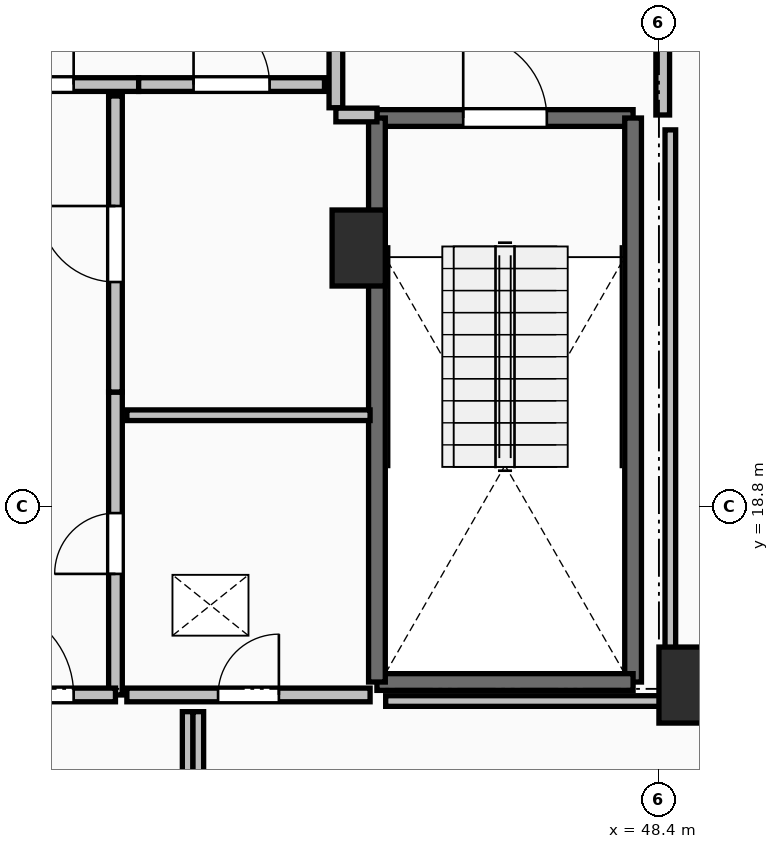
"""IFC4 building model, lengths in metres.
Left out: names, types, materials, properties, quantities, classifications, styles, units other than length and angle.
Written with IfcOpenShell. Run it as: python <this file> out.ifc"""

import sys

from ifc_helpers import new_model, si_unit, direction, frame, frame_2d, origin, origin_2d, place, context, subcontext, project, spatial, rectangle, extrude, element, fill, save


model = new_model("IFC4")
c1 = context("Model", 3, precision=1e-05, world=origin(), true_north=direction((0.0, 1.0)))
c2 = subcontext(c1, "Body", "Model", "MODEL_VIEW")
j1 = project(units=[si_unit("LENGTHUNIT", "METRE"), si_unit("PLANEANGLEUNIT", "RADIAN")], contexts=[c1])
p1 = place(None, origin())
s1 = spatial("IfcSite", under=j1, at=p1, CompositionType="ELEMENT")
p2 = place(p1, origin())
s2 = spatial("IfcBuilding", under=s1, at=p2, CompositionType="ELEMENT")
p3 = place(p2, frame((0.0, 0.0, 273.3)))
s3 = spatial("IfcBuildingStorey", under=s2, at=p3, CompositionType="ELEMENT", Elevation=273.3)
for number, where, z_axis, x_axis in (
    (1, (48.75, 16.45, 0.0), (0.0, 0.0, 1.0), (1.0, 0.0, 0.0)),
    (2, (44.45, 22.2, 0.0), (0.0, 0.0, 1.0), (1.0, 0.0, 0.0)),
):
    element("IfcColumn", number, at=place(p3, frame(where, z_axis=z_axis, x_axis=x_axis)), inside=s3, PredefinedType="PILASTER", context=c2, shape_type="SweptSolid", body=[
        extrude(rectangle(XDim=0.7, YDim=1.0, at=origin_2d()), origin(), (0.0, 0.0, 1.0), 3.55),
    ])
p4 = place(p3, frame((44.69, 23.91, 0.0), z_axis=(0.0, 0.0, 1.0), x_axis=(1.0, 0.0, 0.0)))
e3 = element("IfcWall", 3, at=p4, inside=s3, PredefinedType="SOLIDWALL", context=c2, shape_type="SweptSolid", body=[
    extrude(rectangle(XDim=3.37, YDim=0.22, at=frame_2d((1.685, 0.0))), origin(), (0.0, 0.0, 1.0), 3.29),
])
p5 = place(p4, frame((1.135, 0.0, 0.0)))
e4 = element("IfcOpeningElement", 4, at=p5, cuts=e3, PredefinedType="OPENING", context=c2, shape_type="SweptSolid", body=[
    extrude(rectangle(XDim=1.1, YDim=2.15, at=frame_2d((0.55, 1.075))), frame((0.0, 0.125, 0.0), z_axis=(0.0, -1.0, 0.0), x_axis=(1.0, 0.0, 0.0)), (0.0, 0.0, 1.0), 0.25),
])
p6 = place(p3, frame((48.06, 23.91, 0.0), z_axis=(0.0, 0.0, 1.0), x_axis=(0.0, -1.0, 0.0)))
e5 = element("IfcWall", 5, at=p6, inside=s3, PredefinedType="SOLIDWALL", context=c2, shape_type="SweptSolid", body=[
    extrude(rectangle(XDim=7.42, YDim=0.22, at=frame_2d((3.71, 0.0))), origin(), (0.0, 0.0, 1.0), 3.29),
])
p7 = place(p3, frame((48.06, 16.49, 0.0), z_axis=(0.0, 0.0, 1.0), x_axis=(-1.0, 0.0, 0.0)))
e6 = element("IfcWall", 6, at=p7, inside=s3, PredefinedType="SOLIDWALL", context=c2, shape_type="SweptSolid", body=[
    extrude(rectangle(XDim=3.37, YDim=0.22, at=frame_2d((1.685, 0.0))), origin(), (0.0, 0.0, 1.0), 3.29),
])
p8 = place(p3, frame((44.69, 16.49, 0.0), z_axis=(0.0, 0.0, 1.0), x_axis=(0.0, 1.0, 0.0)))
e7 = element("IfcWall", 7, at=p8, inside=s3, PredefinedType="SOLIDWALL", context=c2, shape_type="SweptSolid", body=[
    extrude(rectangle(XDim=7.42, YDim=0.22, at=frame_2d((3.71, 0.0))), origin(), (0.0, 0.0, 1.0), 3.29),
])
p9 = place(p3, frame((44.15, 27.955, 0.0), z_axis=(0.0, 0.0, 1.0), x_axis=(0.0, -1.0, 0.0)))
e8 = element("IfcWall", 8, at=p9, inside=s3, PredefinedType="PARTITIONING", context=c2, shape_type="SweptSolid", body=[
    extrude(rectangle(XDim=3.91, YDim=0.18, at=frame_2d((1.955, 0.0))), origin(), (0.0, 0.0, 1.0), 3.29),
])
p10 = place(p9, frame((1.355, 0.0, 0.0)))
e9 = element("IfcOpeningElement", 9, at=p10, cuts=e8, PredefinedType="OPENING", context=c2, shape_type="SweptSolid", body=[
    extrude(rectangle(XDim=1.2, YDim=2.15, at=frame_2d((0.6, 1.075))), frame((0.0, 0.105, 0.0), z_axis=(0.0, -1.0, 0.0), x_axis=(1.0, 0.0, 0.0)), (0.0, 0.0, 1.0), 0.21),
])
p11 = place(p3, frame((44.15, 23.95, 0.0), z_axis=(0.0, 0.0, 1.0), x_axis=(1.0, 0.0, 0.0)))
e10 = element("IfcWall", 10, at=p11, inside=s3, PredefinedType="PARTITIONING", context=c2, shape_type="SweptSolid", body=[
    extrude(rectangle(XDim=0.54, YDim=0.18, at=frame_2d((0.27, 0.0))), origin(), (0.0, 0.0, 1.0), 3.29),
])
p12 = place(p3, frame((48.45, 23.95, 0.0), z_axis=(0.0, 0.0, 1.0), x_axis=(0.0, 1.0, 0.0)))
e11 = element("IfcWall", 11, at=p12, inside=s3, PredefinedType="PARTITIONING", context=c2, shape_type="SweptSolid", body=[
    extrude(rectangle(XDim=4.05, YDim=0.18, at=frame_2d((2.025, 0.0))), origin(), (0.0, 0.0, 1.0), 3.29),
])
p13 = place(p12, frame((1.425, 0.0, 0.0)))
e12 = element("IfcOpeningElement", 12, at=p13, cuts=e11, PredefinedType="OPENING", context=c2, shape_type="SweptSolid", body=[
    extrude(rectangle(XDim=1.2, YDim=2.15, at=frame_2d((0.6, 1.075))), frame((0.0, 0.105, 0.0), z_axis=(0.0, -1.0, 0.0), x_axis=(1.0, 0.0, 0.0)), (0.0, 0.0, 1.0), 0.21),
])
p14 = place(p3, frame((38.645, 24.35, 0.0), z_axis=(0.0, 0.0, 1.0), x_axis=(1.0, 0.0, 0.0)))
e13 = element("IfcWall", 13, at=p14, inside=s3, PredefinedType="PARTITIONING", context=c2, shape_type="SweptSolid", body=[
    extrude(rectangle(XDim=2.91, YDim=0.18, at=frame_2d((1.455, 0.0))), origin(), (0.0, 0.0, 1.0), 3.29),
])
p15 = place(p14, frame((0.855, 0.0, 0.0)))
e14 = element("IfcOpeningElement", 14, at=p15, cuts=e13, PredefinedType="OPENING", context=c2, shape_type="SweptSolid", body=[
    extrude(rectangle(XDim=1.2, YDim=2.15, at=frame_2d((0.6, 1.075))), frame((0.0, 0.105, 0.0), z_axis=(0.0, -1.0, 0.0), x_axis=(1.0, 0.0, 0.0)), (0.0, 0.0, 1.0), 0.21),
])
p16 = place(p3, frame((41.555, 24.35, 0.0), z_axis=(0.0, 0.0, 1.0), x_axis=(1.0, 0.0, 0.0)))
e15 = element("IfcWall", 15, at=p16, inside=s3, PredefinedType="PARTITIONING", context=c2, shape_type="SweptSolid", body=[
    extrude(rectangle(XDim=2.445, YDim=0.18, at=frame_2d((1.223, 0.0))), origin(), (0.0, 0.0, 1.0), 3.29),
])
p17 = place(p16, frame((0.722, 0.0, 0.0)))
e16 = element("IfcOpeningElement", 16, at=p17, cuts=e15, PredefinedType="OPENING", context=c2, shape_type="SweptSolid", body=[
    extrude(rectangle(XDim=1.0, YDim=2.15, at=frame_2d((0.5, 1.075))), frame((0.0, 0.105, 0.0), z_axis=(0.0, -1.0, 0.0), x_axis=(1.0, 0.0, 0.0)), (0.0, 0.0, 1.0), 0.21),
])
p18 = place(p3, frame((41.25, 16.32, 0.0), z_axis=(0.0, 0.0, 1.0), x_axis=(0.0, 1.0, 0.0)))
e17 = element("IfcWall", 17, at=p18, inside=s3, PredefinedType="PARTITIONING", context=c2, shape_type="SweptSolid", body=[
    extrude(rectangle(XDim=3.985, YDim=0.18, at=frame_2d((1.992, 0.0))), origin(), (0.0, 0.0, 1.0), 3.29),
])
p19 = place(p18, frame((1.593, 0.0, 0.0)))
e18 = element("IfcOpeningElement", 18, at=p19, cuts=e17, PredefinedType="OPENING", context=c2, shape_type="SweptSolid", body=[
    extrude(rectangle(XDim=0.8, YDim=2.05, at=frame_2d((0.4, 1.025))), frame((0.0, 0.105, 0.0), z_axis=(0.0, -1.0, 0.0), x_axis=(1.0, 0.0, 0.0)), (0.0, 0.0, 1.0), 0.21),
])
p20 = place(p3, frame((41.25, 20.305, 0.0), z_axis=(0.0, 0.0, 1.0), x_axis=(0.0, 1.0, 0.0)))
e19 = element("IfcWall", 19, at=p20, inside=s3, PredefinedType="PARTITIONING", context=c2, shape_type="SweptSolid", body=[
    extrude(rectangle(XDim=3.895, YDim=0.18, at=frame_2d((1.948, 0.0))), origin(), (0.0, 0.0, 1.0), 2.482),
])
p21 = place(p20, frame((1.448, 0.0, 0.0)))
e20 = element("IfcOpeningElement", 20, at=p21, cuts=e19, PredefinedType="OPENING", context=c2, shape_type="SweptSolid", body=[
    extrude(rectangle(XDim=1.0, YDim=2.15, at=frame_2d((0.5, 1.075))), frame((0.0, 0.105, 0.0), z_axis=(0.0, -1.0, 0.0), x_axis=(1.0, 0.0, 0.0)), (0.0, 0.0, 1.0), 0.21),
])
p22 = place(p3, frame((38.95, 16.32, 0.0), z_axis=(0.0, 0.0, 1.0), x_axis=(1.0, 0.0, 0.0)))
e21 = element("IfcWall", 21, at=p22, inside=s3, PredefinedType="PARTITIONING", context=c2, shape_type="SweptSolid", body=[
    extrude(rectangle(XDim=2.3, YDim=0.18, at=frame_2d((1.15, 0.0))), origin(), (0.0, 0.0, 1.0), 3.29),
])
p23 = place(p22, frame((0.55, 0.0, 0.0)))
e22 = element("IfcOpeningElement", 22, at=p23, cuts=e21, PredefinedType="OPENING", context=c2, shape_type="SweptSolid", body=[
    extrude(rectangle(XDim=1.2, YDim=2.15, at=frame_2d((0.6, 1.075))), frame((0.0, 0.105, 0.0), z_axis=(0.0, -1.0, 0.0), x_axis=(1.0, 0.0, 0.0)), (0.0, 0.0, 1.0), 0.21),
])
p24 = place(p3, frame((44.6, 20.0, 0.0), z_axis=(0.0, 0.0, 1.0), x_axis=(-1.0, 0.0, 0.0)))
e23 = element("IfcWall", 23, at=p24, inside=s3, PredefinedType="PARTITIONING", context=c2, shape_type="SweptSolid", body=[
    extrude(rectangle(XDim=3.2, YDim=0.14, at=frame_2d((1.6, 0.0))), origin(), (0.0, 0.0, 1.0), 3.29),
])
p25 = place(p3, frame((41.4, 16.32, 0.0), z_axis=(0.0, 0.0, 1.0), x_axis=(1.0, 0.0, 0.0)))
e24 = element("IfcWall", 24, at=p25, inside=s3, PredefinedType="PARTITIONING", context=c2, shape_type="SweptSolid", body=[
    extrude(rectangle(XDim=3.2, YDim=0.18, at=frame_2d((1.6, 0.0))), origin(), (0.0, 0.0, 1.0), 3.29),
])
p26 = place(p25, frame((1.2, 0.0, 0.0)))
e25 = element("IfcOpeningElement", 25, at=p26, cuts=e24, PredefinedType="OPENING", context=c2, shape_type="SweptSolid", body=[
    extrude(rectangle(XDim=0.8, YDim=2.05, at=frame_2d((0.4, 1.025))), frame((0.0, 0.105, 0.0), z_axis=(0.0, -1.0, 0.0), x_axis=(1.0, 0.0, 0.0)), (0.0, 0.0, 1.0), 0.21),
])
p27 = place(p3, frame((44.805, 16.24, 0.0), z_axis=(0.0, 0.0, 1.0), x_axis=(1.0, 0.0, 0.0)))
e26 = element("IfcWall", 26, at=p27, inside=s3, PredefinedType="PARTITIONING", context=c2, shape_type="SweptSolid", body=[
    extrude(rectangle(XDim=3.745, YDim=0.14, at=frame_2d((1.873, 0.0))), origin(), (0.0, 0.0, 1.0), 2.482),
])
p28 = place(p3, frame((48.55, 16.24, 0.0), z_axis=(0.0, 0.0, 1.0), x_axis=(0.0, 1.0, 0.0)))
e27 = element("IfcWall", 27, at=p28, inside=s3, PredefinedType="PARTITIONING", context=c2, shape_type="SweptSolid", body=[
    extrude(rectangle(XDim=7.514, YDim=0.14, at=frame_2d((3.757, 0.0))), origin(), (0.0, 0.0, 1.0), 2.482),
])
for number, where, z_axis, x_axis in (
    (28, (42.2, 16.1, 0.0), (0.0, 0.0, 1.0), (0.0, -1.0, 0.0)),
    (29, (42.34, 14.25, 0.0), (0.0, 0.0, 1.0), (0.0, 1.0, 0.0)),
):
    element("IfcWall", number, at=place(p3, frame(where, z_axis=z_axis, x_axis=x_axis)), inside=s3, PredefinedType="PARTITIONING", context=c2, shape_type="SweptSolid", body=[
        extrude(rectangle(XDim=1.85, YDim=0.14, at=frame_2d((0.925, 0.0))), origin(), (0.0, 0.0, 1.0), 2.924),
    ])
p29 = place(p5, origin())
e30 = element("IfcDoor", 30, at=p29, inside=s3, OperationType="SINGLE_SWING_LEFT", PredefinedType="DOOR", context=c2, shape_type="SweptSolid", body=[
    extrude(rectangle(XDim=1.1, YDim=2.15, at=frame_2d((0.55, 1.075))), frame((0.0, 0.025, 0.0), z_axis=(0.0, -1.0, 0.0), x_axis=(1.0, 0.0, 0.0)), (0.0, 0.0, 1.0), 0.05),
])
fill(e4, e30)
p30 = place(p15, origin())
e31 = element("IfcDoor", 31, at=p30, inside=s3, OperationType="SINGLE_SWING_RIGHT", PredefinedType="DOOR", context=c2, shape_type="SweptSolid", body=[
    extrude(rectangle(XDim=1.2, YDim=2.15, at=frame_2d((0.6, 1.075))), frame((0.0, 0.025, 0.0), z_axis=(0.0, -1.0, 0.0), x_axis=(1.0, 0.0, 0.0)), (0.0, 0.0, 1.0), 0.05),
])
fill(e14, e31)
p31 = place(p17, origin())
e32 = element("IfcDoor", 32, at=p31, inside=s3, OperationType="SINGLE_SWING_LEFT", PredefinedType="DOOR", context=c2, shape_type="SweptSolid", body=[
    extrude(rectangle(XDim=1.0, YDim=2.15, at=frame_2d((0.5, 1.075))), frame((0.0, 0.025, 0.0), z_axis=(0.0, -1.0, 0.0), x_axis=(1.0, 0.0, 0.0)), (0.0, 0.0, 1.0), 0.05),
])
fill(e16, e32)
p32 = place(p19, origin())
e33 = element("IfcDoor", 33, at=p32, inside=s3, OperationType="SINGLE_SWING_LEFT", PredefinedType="DOOR", context=c2, shape_type="SweptSolid", body=[
    extrude(rectangle(XDim=0.8, YDim=2.05, at=frame_2d((0.4, 1.025))), frame((0.0, 0.025, 0.0), z_axis=(0.0, -1.0, 0.0), x_axis=(1.0, 0.0, 0.0)), (0.0, 0.0, 1.0), 0.05),
])
fill(e18, e33)
p33 = place(p21, origin())
e34 = element("IfcDoor", 34, at=p33, inside=s3, OperationType="SINGLE_SWING_RIGHT", PredefinedType="DOOR", context=c2, shape_type="SweptSolid", body=[
    extrude(rectangle(XDim=1.0, YDim=2.15, at=frame_2d((0.5, 1.075))), frame((0.0, 0.025, 0.0), z_axis=(0.0, -1.0, 0.0), x_axis=(1.0, 0.0, 0.0)), (0.0, 0.0, 1.0), 0.05),
])
fill(e20, e34)
p34 = place(p23, origin())
e35 = element("IfcDoor", 35, at=p34, inside=s3, OperationType="SINGLE_SWING_LEFT", PredefinedType="DOOR", context=c2, shape_type="SweptSolid", body=[
    extrude(rectangle(XDim=1.2, YDim=2.15, at=frame_2d((0.6, 1.075))), frame((0.0, 0.025, 0.0), z_axis=(0.0, -1.0, 0.0), x_axis=(1.0, 0.0, 0.0)), (0.0, 0.0, 1.0), 0.05),
])
fill(e22, e35)
p35 = place(p26, origin())
e36 = element("IfcDoor", 36, at=p35, inside=s3, OperationType="SINGLE_SWING_RIGHT", PredefinedType="DOOR", context=c2, shape_type="SweptSolid", body=[
    extrude(rectangle(XDim=0.8, YDim=2.05, at=frame_2d((0.4, 1.025))), frame((0.0, 0.025, 0.0), z_axis=(0.0, -1.0, 0.0), x_axis=(1.0, 0.0, 0.0)), (0.0, 0.0, 1.0), 0.05),
])
fill(e25, e36)
save(model, sys.argv[1])
